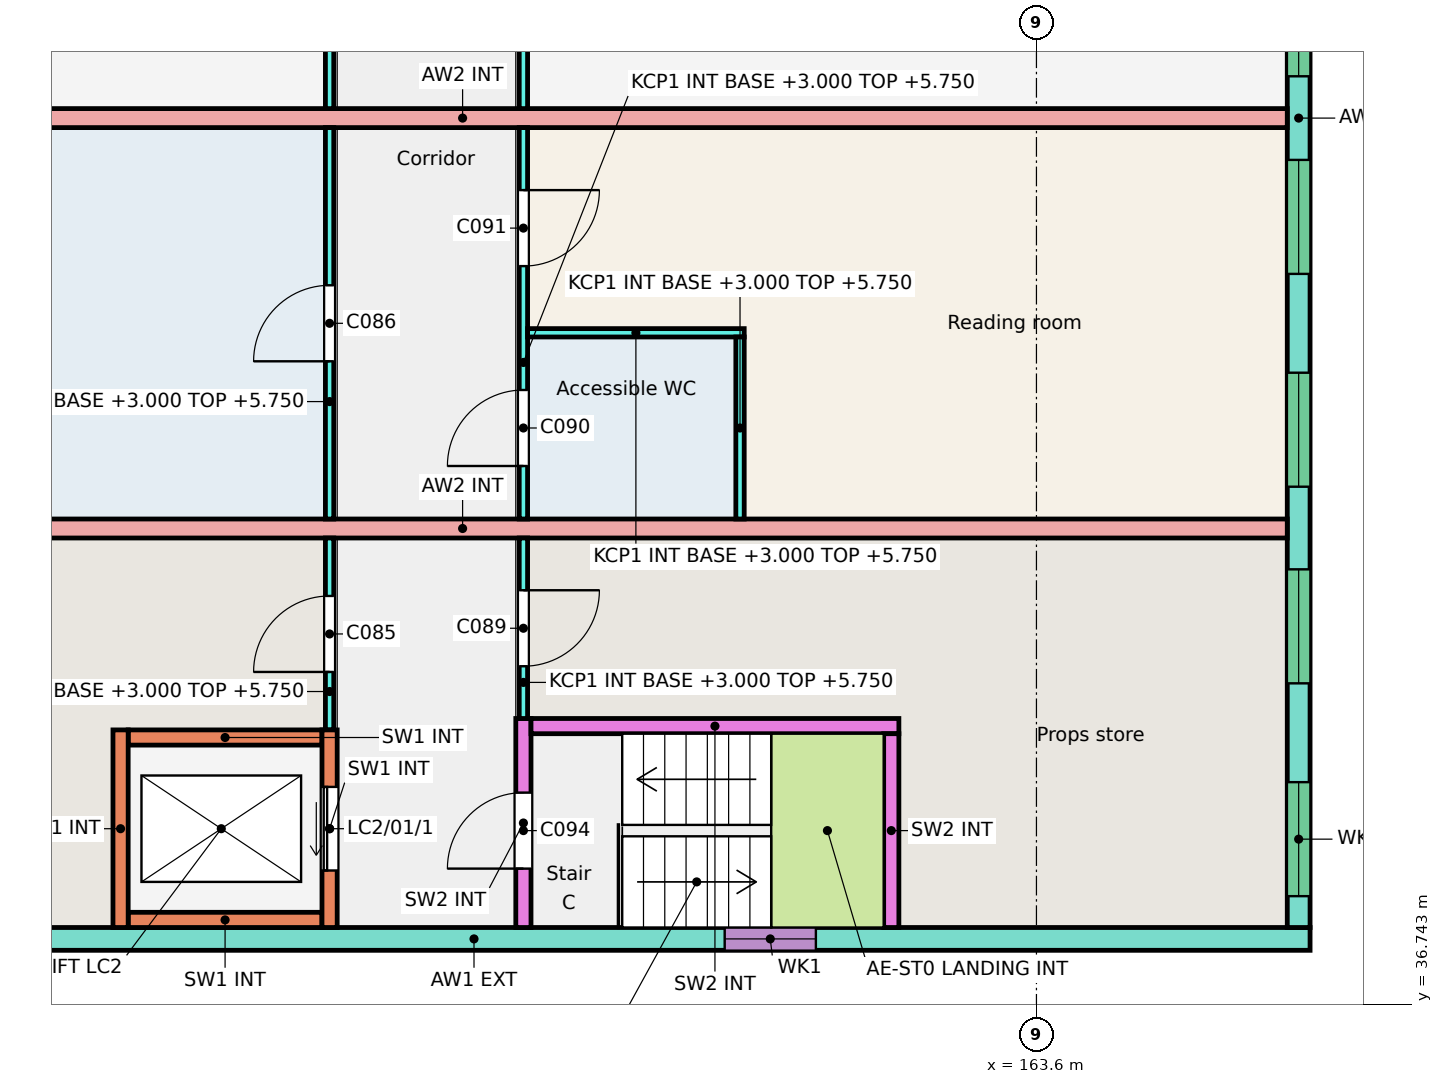
"""IFC4 building model, lengths in metres.
Left out: names, types, materials, properties, quantities, classifications, styles, units other than length and angle.
Written with IfcOpenShell. Run it as: python <this file> out.ifc"""

import sys

from ifc_helpers import new_model, si_unit, direction, frame, frame_2d, origin, place, context, subcontext, project, spatial, rectangle, extrude, element, fill, save


model = new_model("IFC4")
c1 = context("Model", 3, precision=1e-05, world=origin(), true_north=direction((0.0, 1.0)))
c2 = subcontext(c1, "Body", "Model", "MODEL_VIEW")
j1 = project(units=[si_unit("LENGTHUNIT", "METRE"), si_unit("PLANEANGLEUNIT", "RADIAN")], contexts=[c1])
p1 = place(None, origin())
s1 = spatial("IfcSite", under=j1, at=p1, CompositionType="ELEMENT")
p2 = place(p1, origin())
s2 = spatial("IfcBuilding", under=s1, at=p2, CompositionType="ELEMENT")
p3 = place(p2, frame((0.0, 0.0, 3.0)))
s3 = spatial("IfcBuildingStorey", under=s2, at=p3, CompositionType="ELEMENT", Elevation=3.0)
p4 = place(p3, frame((145.2, 37.6, 0.0), z_axis=(0.0, 0.0, 1.0), x_axis=(1.0, 0.0, 0.0)))
e1 = element("IfcWall", 1, at=p4, inside=s3, PredefinedType="SOLIDWALL", context=c2, shape_type="SweptSolid", body=[
    extrude(rectangle(XDim=22.0, YDim=0.3, at=frame_2d((11.0, 0.0))), origin(), (0.0, 0.0, 1.0), 3.0),
])
p5 = place(p4, frame((14.298, 0.0, 0.9)))
e2 = element("IfcOpeningElement", 2, at=p5, cuts=e1, PredefinedType="OPENING", context=c2, shape_type="SweptSolid", body=[
    extrude(rectangle(XDim=1.2, YDim=1.5, at=frame_2d((0.6, 0.75))), frame((0.0, 0.16, 0.0), z_axis=(0.0, -1.0, 0.0), x_axis=(1.0, 0.0, 0.0)), (0.0, 0.0, 1.0), 0.32),
])
p6 = place(p3, frame((167.05, 37.75, 0.0), z_axis=(0.0, 0.0, 1.0), x_axis=(0.0, 1.0, 0.0)))
e3 = element("IfcWall", 3, at=p6, inside=s3, PredefinedType="SOLIDWALL", context=c2, shape_type="SweptSolid", body=[
    extrude(rectangle(XDim=21.3, YDim=0.3, at=frame_2d((10.65, 0.0))), origin(), (0.0, 0.0, 1.0), 3.0),
])
p7 = place(p6, frame((0.413, 0.0, 0.9)))
e4 = element("IfcOpeningElement", 4, at=p7, cuts=e3, PredefinedType="OPENING", context=c2, shape_type="SweptSolid", body=[
    extrude(rectangle(XDim=1.5, YDim=1.4, at=frame_2d((0.75, 0.7))), frame((0.0, 0.16, 0.0), z_axis=(0.0, -1.0, 0.0), x_axis=(1.0, 0.0, 0.0)), (0.0, 0.0, 1.0), 0.32),
])
p8 = place(p6, frame((3.212, 0.0, 0.9)))
e5 = element("IfcOpeningElement", 5, at=p8, cuts=e3, PredefinedType="OPENING", context=c2, shape_type="SweptSolid", body=[
    extrude(rectangle(XDim=1.5, YDim=1.4, at=frame_2d((0.75, 0.7))), frame((0.0, 0.16, 0.0), z_axis=(0.0, -1.0, 0.0), x_axis=(1.0, 0.0, 0.0)), (0.0, 0.0, 1.0), 0.32),
])
p9 = place(p6, frame((5.8, 0.0, 0.9)))
e6 = element("IfcOpeningElement", 6, at=p9, cuts=e3, PredefinedType="OPENING", context=c2, shape_type="SweptSolid", body=[
    extrude(rectangle(XDim=1.5, YDim=1.4, at=frame_2d((0.75, 0.7))), frame((0.0, 0.16, 0.0), z_axis=(0.0, -1.0, 0.0), x_axis=(1.0, 0.0, 0.0)), (0.0, 0.0, 1.0), 0.32),
])
p10 = place(p6, frame((8.6, 0.0, 0.9)))
e7 = element("IfcOpeningElement", 7, at=p10, cuts=e3, PredefinedType="OPENING", context=c2, shape_type="SweptSolid", body=[
    extrude(rectangle(XDim=1.5, YDim=1.4, at=frame_2d((0.75, 0.7))), frame((0.0, 0.16, 0.0), z_axis=(0.0, -1.0, 0.0), x_axis=(1.0, 0.0, 0.0)), (0.0, 0.0, 1.0), 0.32),
])
p11 = place(p6, frame((11.2, 0.0, 0.9)))
e8 = element("IfcOpeningElement", 8, at=p11, cuts=e3, PredefinedType="OPENING", context=c2, shape_type="SweptSolid", body=[
    extrude(rectangle(XDim=1.5, YDim=1.4, at=frame_2d((0.75, 0.7))), frame((0.0, 0.16, 0.0), z_axis=(0.0, -1.0, 0.0), x_axis=(1.0, 0.0, 0.0)), (0.0, 0.0, 1.0), 0.32),
])
p12 = place(p6, frame((14.0, 0.0, 0.9)))
e9 = element("IfcOpeningElement", 9, at=p12, cuts=e3, PredefinedType="OPENING", context=c2, shape_type="SweptSolid", body=[
    extrude(rectangle(XDim=1.5, YDim=1.4, at=frame_2d((0.75, 0.7))), frame((0.0, 0.16, 0.0), z_axis=(0.0, -1.0, 0.0), x_axis=(1.0, 0.0, 0.0)), (0.0, 0.0, 1.0), 0.32),
])
p13 = place(p6, frame((16.587, 0.0, 0.9)))
e10 = element("IfcOpeningElement", 10, at=p13, cuts=e3, PredefinedType="OPENING", context=c2, shape_type="SweptSolid", body=[
    extrude(rectangle(XDim=1.5, YDim=1.4, at=frame_2d((0.75, 0.7))), frame((0.0, 0.16, 0.0), z_axis=(0.0, -1.0, 0.0), x_axis=(1.0, 0.0, 0.0)), (0.0, 0.0, 1.0), 0.32),
])
p14 = place(p6, frame((19.387, 0.0, 0.9)))
e11 = element("IfcOpeningElement", 11, at=p14, cuts=e3, PredefinedType="OPENING", context=c2, shape_type="SweptSolid", body=[
    extrude(rectangle(XDim=1.5, YDim=1.4, at=frame_2d((0.75, 0.7))), frame((0.0, 0.16, 0.0), z_axis=(0.0, -1.0, 0.0), x_axis=(1.0, 0.0, 0.0)), (0.0, 0.0, 1.0), 0.32),
])
for number, where, z_axis, x_axis in (
    (12, (145.2, 43.0, 0.0), (0.0, 0.0, 1.0), (1.0, 0.0, 0.0)),
    (13, (145.2, 48.4, 0.0), (0.0, 0.0, 1.0), (1.0, 0.0, 0.0)),
):
    element("IfcWall", number, at=place(p3, frame(where, z_axis=z_axis, x_axis=x_axis)), inside=s3, PredefinedType="SOLIDWALL", context=c2, shape_type="SweptSolid", body=[
        extrude(rectangle(XDim=21.7, YDim=0.25, at=frame_2d((10.85, 0.0))), origin(), (0.0, 0.0, 1.0), 3.0),
    ])
p15 = place(p3, frame((154.3, 40.35, 0.0), z_axis=(0.0, 0.0, 1.0), x_axis=(0.0, 1.0, 0.0)))
e14 = element("IfcWall", 14, at=p15, inside=s3, PredefinedType="PARTITIONING", context=c2, shape_type="SweptSolid", body=[
    extrude(rectangle(XDim=2.525, YDim=0.11, at=frame_2d((1.262, 0.0))), origin(), (0.0, 0.0, 1.0), 2.75),
])
p16 = place(p15, frame((0.762, 0.0, 0.0)))
e15 = element("IfcOpeningElement", 15, at=p16, cuts=e14, PredefinedType="OPENING", context=c2, shape_type="SweptSolid", body=[
    extrude(rectangle(XDim=1.0, YDim=2.1, at=frame_2d((0.5, 1.05))), frame((0.0, 0.065, 0.0), z_axis=(0.0, -1.0, 0.0), x_axis=(1.0, 0.0, 0.0)), (0.0, 0.0, 1.0), 0.13),
])
p17 = place(p3, frame((154.3, 43.125, 0.0), z_axis=(0.0, 0.0, 1.0), x_axis=(0.0, 1.0, 0.0)))
e16 = element("IfcWall", 16, at=p17, inside=s3, PredefinedType="PARTITIONING", context=c2, shape_type="SweptSolid", body=[
    extrude(rectangle(XDim=5.15, YDim=0.11, at=frame_2d((2.575, 0.0))), origin(), (0.0, 0.0, 1.0), 2.75),
])
p18 = place(p17, frame((2.075, 0.0, 0.0)))
e17 = element("IfcOpeningElement", 17, at=p18, cuts=e16, PredefinedType="OPENING", context=c2, shape_type="SweptSolid", body=[
    extrude(rectangle(XDim=1.0, YDim=2.1, at=frame_2d((0.5, 1.05))), frame((0.0, 0.065, 0.0), z_axis=(0.0, -1.0, 0.0), x_axis=(1.0, 0.0, 0.0)), (0.0, 0.0, 1.0), 0.13),
])
p19 = place(p3, frame((154.3, 48.525, 0.0), z_axis=(0.0, 0.0, 1.0), x_axis=(0.0, 1.0, 0.0)))
e18 = element("IfcWall", 18, at=p19, inside=s3, PredefinedType="PARTITIONING", context=c2, shape_type="SweptSolid", body=[
    extrude(rectangle(XDim=5.15, YDim=0.11, at=frame_2d((2.575, 0.0))), origin(), (0.0, 0.0, 1.0), 2.75),
])
p20 = place(p19, frame((2.075, 0.0, 0.0)))
e19 = element("IfcOpeningElement", 19, at=p20, cuts=e18, PredefinedType="OPENING", context=c2, shape_type="SweptSolid", body=[
    extrude(rectangle(XDim=1.0, YDim=2.1, at=frame_2d((0.5, 1.05))), frame((0.0, 0.065, 0.0), z_axis=(0.0, -1.0, 0.0), x_axis=(1.0, 0.0, 0.0)), (0.0, 0.0, 1.0), 0.13),
])
p21 = place(p3, frame((156.85, 37.75, 0.0), z_axis=(0.0, 0.0, 1.0), x_axis=(0.0, 1.0, 0.0)))
e20 = element("IfcWall", 20, at=p21, inside=s3, PredefinedType="SOLIDWALL", context=c2, shape_type="SweptSolid", body=[
    extrude(rectangle(XDim=2.75, YDim=0.2, at=frame_2d((1.375, 0.0))), origin(), (0.0, 0.0, 1.0), 2.75),
])
p22 = place(p21, frame((0.775, 0.0, 0.0)))
e21 = element("IfcOpeningElement", 21, at=p22, cuts=e20, PredefinedType="OPENING", context=c2, shape_type="SweptSolid", body=[
    extrude(rectangle(XDim=1.0, YDim=2.1, at=frame_2d((0.5, 1.05))), frame((0.0, 0.11, 0.0), z_axis=(0.0, -1.0, 0.0), x_axis=(1.0, 0.0, 0.0)), (0.0, 0.0, 1.0), 0.22),
])
p23 = place(p3, frame((156.85, 40.5, 0.0), z_axis=(0.0, 0.0, 1.0), x_axis=(0.0, 1.0, 0.0)))
e22 = element("IfcWall", 22, at=p23, inside=s3, PredefinedType="PARTITIONING", context=c2, shape_type="SweptSolid", body=[
    extrude(rectangle(XDim=2.375, YDim=0.11, at=frame_2d((1.188, 0.0))), origin(), (0.0, 0.0, 1.0), 2.75),
])
p24 = place(p23, frame((0.688, 0.0, 0.0)))
e23 = element("IfcOpeningElement", 23, at=p24, cuts=e22, PredefinedType="OPENING", context=c2, shape_type="SweptSolid", body=[
    extrude(rectangle(XDim=1.0, YDim=2.1, at=frame_2d((0.5, 1.05))), frame((0.0, 0.065, 0.0), z_axis=(0.0, -1.0, 0.0), x_axis=(1.0, 0.0, 0.0)), (0.0, 0.0, 1.0), 0.13),
])
p25 = place(p3, frame((156.85, 43.125, 0.0), z_axis=(0.0, 0.0, 1.0), x_axis=(0.0, 1.0, 0.0)))
e24 = element("IfcWall", 24, at=p25, inside=s3, PredefinedType="PARTITIONING", context=c2, shape_type="SweptSolid", body=[
    extrude(rectangle(XDim=5.15, YDim=0.11, at=frame_2d((2.575, 0.0))), origin(), (0.0, 0.0, 1.0), 2.75),
])
p26 = place(p25, frame((0.698, 0.0, 0.0)))
e25 = element("IfcOpeningElement", 25, at=p26, cuts=e24, PredefinedType="OPENING", context=c2, shape_type="SweptSolid", body=[
    extrude(rectangle(XDim=1.0, YDim=2.1, at=frame_2d((0.5, 1.05))), frame((0.0, 0.065, 0.0), z_axis=(0.0, -1.0, 0.0), x_axis=(1.0, 0.0, 0.0)), (0.0, 0.0, 1.0), 0.13),
])
p27 = place(p25, frame((3.327, 0.0, 0.0)))
e26 = element("IfcOpeningElement", 26, at=p27, cuts=e24, PredefinedType="OPENING", context=c2, shape_type="SweptSolid", body=[
    extrude(rectangle(XDim=1.0, YDim=2.1, at=frame_2d((0.5, 1.05))), frame((0.0, 0.065, 0.0), z_axis=(0.0, -1.0, 0.0), x_axis=(1.0, 0.0, 0.0)), (0.0, 0.0, 1.0), 0.13),
])
p28 = place(p3, frame((156.85, 48.525, 0.0), z_axis=(0.0, 0.0, 1.0), x_axis=(0.0, 1.0, 0.0)))
e27 = element("IfcWall", 27, at=p28, inside=s3, PredefinedType="PARTITIONING", context=c2, shape_type="SweptSolid", body=[
    extrude(rectangle(XDim=5.15, YDim=0.11, at=frame_2d((2.575, 0.0))), origin(), (0.0, 0.0, 1.0), 2.75),
])
p29 = place(p28, frame((2.075, 0.0, 0.0)))
e28 = element("IfcOpeningElement", 28, at=p29, cuts=e27, PredefinedType="OPENING", context=c2, shape_type="SweptSolid", body=[
    extrude(rectangle(XDim=1.0, YDim=2.1, at=frame_2d((0.5, 1.05))), frame((0.0, 0.065, 0.0), z_axis=(0.0, -1.0, 0.0), x_axis=(1.0, 0.0, 0.0)), (0.0, 0.0, 1.0), 0.13),
])
p30 = place(p3, frame((156.95, 40.4, 0.0), z_axis=(0.0, 0.0, 1.0), x_axis=(1.0, 0.0, 0.0)))
e29 = element("IfcWall", 29, at=p30, inside=s3, PredefinedType="SOLIDWALL", context=c2, shape_type="SweptSolid", body=[
    extrude(rectangle(XDim=4.84, YDim=0.2, at=frame_2d((2.42, 0.0))), origin(), (0.0, 0.0, 1.0), 2.75),
])
p31 = place(p3, frame((161.69, 37.75, 0.0), z_axis=(0.0, 0.0, 1.0), x_axis=(0.0, 1.0, 0.0)))
e30 = element("IfcWall", 30, at=p31, inside=s3, PredefinedType="SOLIDWALL", context=c2, shape_type="SweptSolid", body=[
    extrude(rectangle(XDim=2.55, YDim=0.2, at=frame_2d((1.275, 0.0))), origin(), (0.0, 0.0, 1.0), 2.75),
])
p32 = place(p3, frame((156.905, 45.575, 0.0), z_axis=(0.0, 0.0, 1.0), x_axis=(1.0, 0.0, 0.0)))
e31 = element("IfcWall", 31, at=p32, inside=s3, PredefinedType="PARTITIONING", context=c2, shape_type="SweptSolid", body=[
    extrude(rectangle(XDim=2.85, YDim=0.11, at=frame_2d((1.425, 0.0))), origin(), (0.0, 0.0, 1.0), 2.75),
])
p33 = place(p3, frame((159.7, 43.125, 0.0), z_axis=(0.0, 0.0, 1.0), x_axis=(0.0, 1.0, 0.0)))
e32 = element("IfcWall", 32, at=p33, inside=s3, PredefinedType="PARTITIONING", context=c2, shape_type="SweptSolid", body=[
    extrude(rectangle(XDim=2.395, YDim=0.11, at=frame_2d((1.198, 0.0))), origin(), (0.0, 0.0, 1.0), 2.75),
])
for number, where, z_axis, x_axis in (
    (33, (151.65, 40.25, 0.0), (0.0, 0.0, 1.0), (1.0, 0.0, 0.0)),
    (34, (151.65, 37.85, 0.0), (0.0, 0.0, 1.0), (1.0, 0.0, 0.0)),
):
    element("IfcWall", number, at=place(p3, frame(where, z_axis=z_axis, x_axis=x_axis)), inside=s3, PredefinedType="SOLIDWALL", context=c2, shape_type="SweptSolid", body=[
        extrude(rectangle(XDim=2.55, YDim=0.2, at=frame_2d((1.275, 0.0))), origin(), (0.0, 0.0, 1.0), 3.0),
    ])
p34 = place(p3, frame((151.55, 37.75, 0.0), z_axis=(0.0, 0.0, 1.0), x_axis=(0.0, 1.0, 0.0)))
e35 = element("IfcWall", 35, at=p34, inside=s3, PredefinedType="SOLIDWALL", context=c2, shape_type="SweptSolid", body=[
    extrude(rectangle(XDim=2.6, YDim=0.2, at=frame_2d((1.3, 0.0))), origin(), (0.0, 0.0, 1.0), 3.0),
])
p35 = place(p3, frame((154.3, 37.75, 0.0), z_axis=(0.0, 0.0, 1.0), x_axis=(0.0, 1.0, 0.0)))
e36 = element("IfcWall", 36, at=p35, inside=s3, PredefinedType="SOLIDWALL", context=c2, shape_type="SweptSolid", body=[
    extrude(rectangle(XDim=2.6, YDim=0.2, at=frame_2d((1.3, 0.0))), origin(), (0.0, 0.0, 1.0), 3.0),
])
p36 = place(p35, frame((0.75, 0.0, 0.0)))
e37 = element("IfcOpeningElement", 37, at=p36, cuts=e36, PredefinedType="OPENING", context=c2, shape_type="SweptSolid", body=[
    extrude(rectangle(XDim=1.1, YDim=2.1, at=frame_2d((0.55, 1.05))), frame((0.0, 0.11, 0.0), z_axis=(0.0, -1.0, 0.0), x_axis=(1.0, 0.0, 0.0)), (0.0, 0.0, 1.0), 0.22),
])
p37 = place(p7, origin())
e38 = element("IfcWindow", 38, at=p37, inside=s3, PartitioningType="SINGLE_PANEL", PredefinedType="WINDOW", context=c2, shape_type="SweptSolid", body=[
    extrude(rectangle(XDim=1.5, YDim=1.4, at=frame_2d((0.75, 0.7))), frame((0.0, 0.03, 0.0), z_axis=(0.0, -1.0, 0.0), x_axis=(1.0, 0.0, 0.0)), (0.0, 0.0, 1.0), 0.06),
])
fill(e4, e38)
p38 = place(p8, origin())
e39 = element("IfcWindow", 39, at=p38, inside=s3, PartitioningType="SINGLE_PANEL", PredefinedType="WINDOW", context=c2, shape_type="SweptSolid", body=[
    extrude(rectangle(XDim=1.5, YDim=1.4, at=frame_2d((0.75, 0.7))), frame((0.0, 0.03, 0.0), z_axis=(0.0, -1.0, 0.0), x_axis=(1.0, 0.0, 0.0)), (0.0, 0.0, 1.0), 0.06),
])
fill(e5, e39)
p39 = place(p9, origin())
e40 = element("IfcWindow", 40, at=p39, inside=s3, PartitioningType="SINGLE_PANEL", PredefinedType="WINDOW", context=c2, shape_type="SweptSolid", body=[
    extrude(rectangle(XDim=1.5, YDim=1.4, at=frame_2d((0.75, 0.7))), frame((0.0, 0.03, 0.0), z_axis=(0.0, -1.0, 0.0), x_axis=(1.0, 0.0, 0.0)), (0.0, 0.0, 1.0), 0.06),
])
fill(e6, e40)
p40 = place(p10, origin())
e41 = element("IfcWindow", 41, at=p40, inside=s3, PartitioningType="SINGLE_PANEL", PredefinedType="WINDOW", context=c2, shape_type="SweptSolid", body=[
    extrude(rectangle(XDim=1.5, YDim=1.4, at=frame_2d((0.75, 0.7))), frame((0.0, 0.03, 0.0), z_axis=(0.0, -1.0, 0.0), x_axis=(1.0, 0.0, 0.0)), (0.0, 0.0, 1.0), 0.06),
])
fill(e7, e41)
p41 = place(p11, origin())
e42 = element("IfcWindow", 42, at=p41, inside=s3, PartitioningType="SINGLE_PANEL", PredefinedType="WINDOW", context=c2, shape_type="SweptSolid", body=[
    extrude(rectangle(XDim=1.5, YDim=1.4, at=frame_2d((0.75, 0.7))), frame((0.0, 0.03, 0.0), z_axis=(0.0, -1.0, 0.0), x_axis=(1.0, 0.0, 0.0)), (0.0, 0.0, 1.0), 0.06),
])
fill(e8, e42)
p42 = place(p5, origin())
e43 = element("IfcWindow", 43, at=p42, inside=s3, PartitioningType="SINGLE_PANEL", PredefinedType="WINDOW", context=c2, shape_type="SweptSolid", body=[
    extrude(rectangle(XDim=1.2, YDim=1.5, at=frame_2d((0.6, 0.75))), frame((0.0, 0.03, 0.0), z_axis=(0.0, -1.0, 0.0), x_axis=(1.0, 0.0, 0.0)), (0.0, 0.0, 1.0), 0.06),
])
fill(e2, e43)
p43 = place(p16, origin())
e44 = element("IfcDoor", 44, at=p43, inside=s3, OperationType="SINGLE_SWING_LEFT", PredefinedType="DOOR", context=c2, shape_type="SweptSolid", body=[
    extrude(rectangle(XDim=1.0, YDim=2.1, at=frame_2d((0.5, 1.05))), frame((0.0, 0.025, 0.0), z_axis=(0.0, -1.0, 0.0), x_axis=(1.0, 0.0, 0.0)), (0.0, 0.0, 1.0), 0.05),
])
fill(e15, e44)
p44 = place(p18, origin())
e45 = element("IfcDoor", 45, at=p44, inside=s3, OperationType="SINGLE_SWING_LEFT", PredefinedType="DOOR", context=c2, shape_type="SweptSolid", body=[
    extrude(rectangle(XDim=1.0, YDim=2.1, at=frame_2d((0.5, 1.05))), frame((0.0, 0.025, 0.0), z_axis=(0.0, -1.0, 0.0), x_axis=(1.0, 0.0, 0.0)), (0.0, 0.0, 1.0), 0.05),
])
fill(e17, e45)
p45 = place(p24, origin())
e46 = element("IfcDoor", 46, at=p45, inside=s3, OperationType="SINGLE_SWING_RIGHT", PredefinedType="DOOR", context=c2, shape_type="SweptSolid", body=[
    extrude(rectangle(XDim=1.0, YDim=2.1, at=frame_2d((0.5, 1.05))), frame((0.0, 0.025, 0.0), z_axis=(0.0, -1.0, 0.0), x_axis=(1.0, 0.0, 0.0)), (0.0, 0.0, 1.0), 0.05),
])
fill(e23, e46)
p46 = place(p26, origin())
e47 = element("IfcDoor", 47, at=p46, inside=s3, OperationType="SINGLE_SWING_LEFT", PredefinedType="DOOR", context=c2, shape_type="SweptSolid", body=[
    extrude(rectangle(XDim=1.0, YDim=2.1, at=frame_2d((0.5, 1.05))), frame((0.0, 0.025, 0.0), z_axis=(0.0, -1.0, 0.0), x_axis=(1.0, 0.0, 0.0)), (0.0, 0.0, 1.0), 0.05),
])
fill(e25, e47)
p47 = place(p27, origin())
e48 = element("IfcDoor", 48, at=p47, inside=s3, OperationType="SINGLE_SWING_RIGHT", PredefinedType="DOOR", context=c2, shape_type="SweptSolid", body=[
    extrude(rectangle(XDim=1.0, YDim=2.1, at=frame_2d((0.5, 1.05))), frame((0.0, 0.025, 0.0), z_axis=(0.0, -1.0, 0.0), x_axis=(1.0, 0.0, 0.0)), (0.0, 0.0, 1.0), 0.05),
])
fill(e26, e48)
p48 = place(p22, origin())
e49 = element("IfcDoor", 49, at=p48, inside=s3, OperationType="SINGLE_SWING_LEFT", PredefinedType="DOOR", context=c2, shape_type="SweptSolid", body=[
    extrude(rectangle(XDim=1.0, YDim=2.1, at=frame_2d((0.5, 1.05))), frame((0.0, 0.025, 0.0), z_axis=(0.0, -1.0, 0.0), x_axis=(1.0, 0.0, 0.0)), (0.0, 0.0, 1.0), 0.05),
])
fill(e21, e49)
p49 = place(p36, origin())
e50 = element("IfcDoor", 50, at=p49, inside=s3, OperationType="SLIDING_TO_LEFT", PredefinedType="DOOR", context=c2, shape_type="SweptSolid", body=[
    extrude(rectangle(XDim=1.1, YDim=2.1, at=frame_2d((0.55, 1.05))), frame((0.0, 0.025, 0.0), z_axis=(0.0, -1.0, 0.0), x_axis=(1.0, 0.0, 0.0)), (0.0, 0.0, 1.0), 0.05),
])
fill(e37, e50)
save(model, sys.argv[1])
